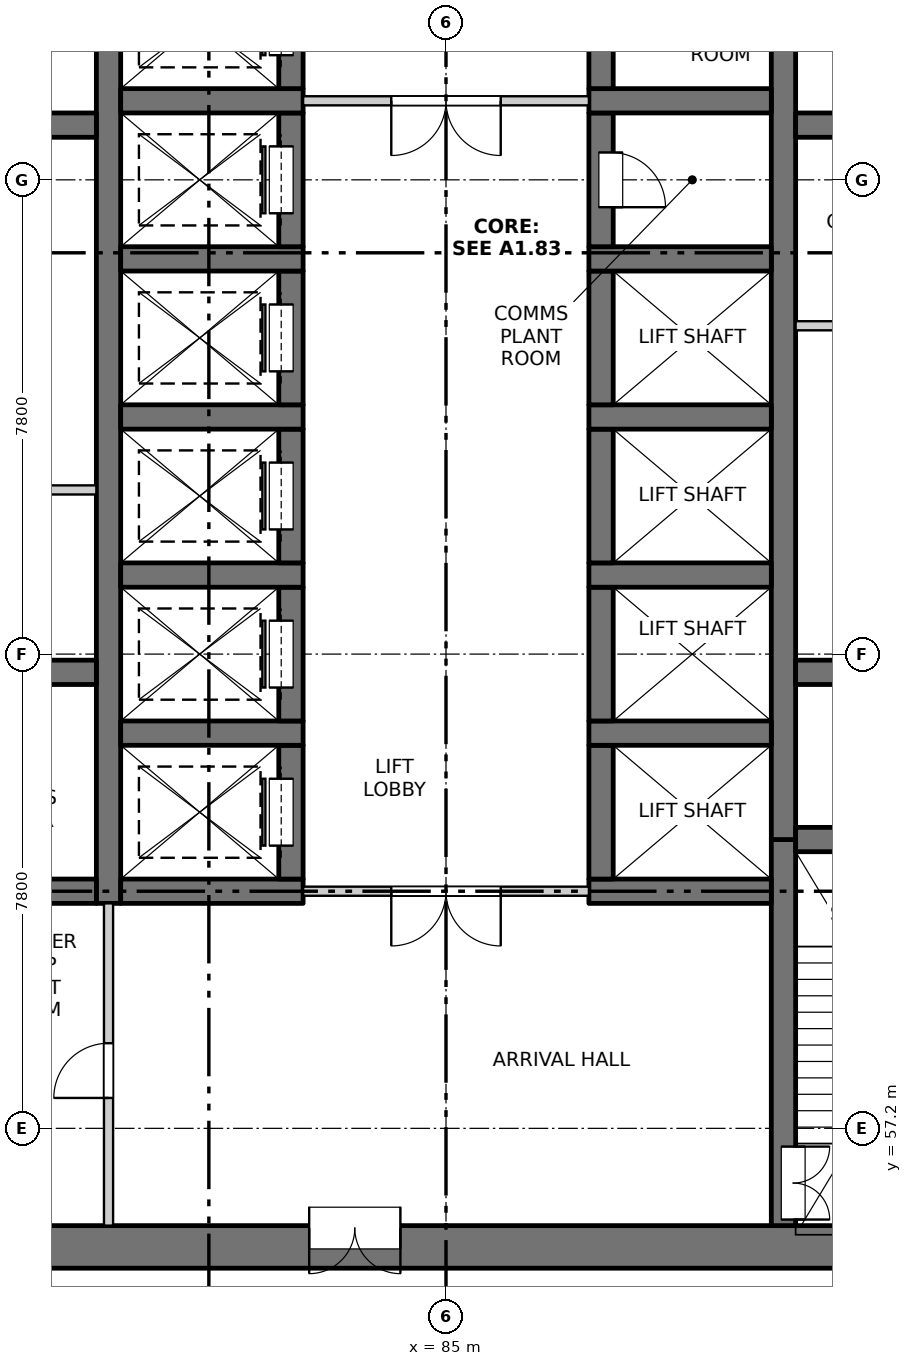
"""IFC4 building model, lengths in metres.
Left out: names, types, materials, properties, quantities, classifications, styles, units other than length and angle.
Written with IfcOpenShell. Run it as: python <this file> out.ifc"""

import sys

from ifc_helpers import new_model, si_unit, direction, frame, frame_2d, origin, place, context, subcontext, project, spatial, rectangle, extrude, element, fill, save


model = new_model("IFC4")
c1 = context("Model", 3, precision=1e-05, world=origin(), true_north=direction((0.0, 1.0)))
c2 = subcontext(c1, "Body", "Model", "MODEL_VIEW")
j1 = project(units=[si_unit("LENGTHUNIT", "METRE"), si_unit("PLANEANGLEUNIT", "RADIAN")], contexts=[c1])
p1 = place(None, origin())
s1 = spatial("IfcSite", under=j1, at=p1, CompositionType="ELEMENT")
p2 = place(p1, origin())
s2 = spatial("IfcBuilding", under=s1, at=p2, CompositionType="ELEMENT")
p3 = place(p2, frame((0.0, 0.0, 95.4)))
s3 = spatial("IfcBuildingStorey", under=s2, at=p3, CompositionType="ELEMENT", Elevation=95.4)
p4 = place(p3, frame((75.6, 55.25, -0.3), z_axis=(0.0, 0.0, 1.0), x_axis=(1.0, 0.0, 0.0)))
e1 = element("IfcWall", 1, at=p4, inside=s3, PredefinedType="SOLIDWALL", context=c2, shape_type="SweptSolid", body=[
    extrude(rectangle(XDim=18.8, YDim=0.7, at=frame_2d((9.4, 0.0))), origin(), (0.0, 0.0, 1.0), 4.5),
])
p5 = place(p4, frame((7.15, 0.0, 0.3)))
e2 = element("IfcOpeningElement", 2, at=p5, cuts=e1, PredefinedType="OPENING", context=c2, shape_type="SweptSolid", body=[
    extrude(rectangle(XDim=1.5, YDim=2.1, at=frame_2d((0.75, 1.05))), frame((0.0, 0.36, 0.0), z_axis=(0.0, -1.0, 0.0), x_axis=(1.0, 0.0, 0.0)), (0.0, 0.0, 1.0), 0.72),
])
p6 = place(p3, frame((79.45, 60.9, -0.3), z_axis=(0.0, 0.0, 1.0), x_axis=(0.0, 1.0, 0.0)))
e3 = element("IfcWall", 3, at=p6, inside=s3, PredefinedType="SOLIDWALL", context=c2, shape_type="SweptSolid", body=[
    extrude(rectangle(XDim=16.4, YDim=0.4, at=frame_2d((8.2, 0.0))), origin(), (0.0, 0.0, 1.0), 4.5),
])
p7 = place(p3, frame((90.55, 55.6, -0.3), z_axis=(0.0, 0.0, 1.0), x_axis=(0.0, 1.0, 0.0)))
e4 = element("IfcWall", 4, at=p7, inside=s3, PredefinedType="SOLIDWALL", context=c2, shape_type="SweptSolid", body=[
    extrude(rectangle(XDim=6.35, YDim=0.4, at=frame_2d((3.175, 0.0))), origin(), (0.0, 0.0, 1.0), 4.5),
])
p8 = place(p7, frame((0.1, 0.0, 0.3)))
e5 = element("IfcOpeningElement", 5, at=p8, cuts=e4, PredefinedType="OPENING", context=c2, shape_type="SweptSolid", body=[
    extrude(rectangle(XDim=1.2, YDim=2.1, at=frame_2d((0.6, 1.05))), frame((0.0, 0.21, 0.0), z_axis=(0.0, -1.0, 0.0), x_axis=(1.0, 0.0, 0.0)), (0.0, 0.0, 1.0), 0.42),
])
p9 = place(p3, frame((90.55, 61.95, -0.3), z_axis=(0.0, 0.0, 1.0), x_axis=(0.0, 1.0, 0.0)))
e6 = element("IfcWall", 6, at=p9, inside=s3, PredefinedType="SOLIDWALL", context=c2, shape_type="SweptSolid", body=[
    extrude(rectangle(XDim=15.35, YDim=0.4, at=frame_2d((7.675, 0.0))), origin(), (0.0, 0.0, 1.0), 4.5),
])
p10 = place(p3, frame((79.65, 61.1, -0.3), z_axis=(0.0, 0.0, 1.0), x_axis=(1.0, 0.0, 0.0)))
e7 = element("IfcWall", 7, at=p10, inside=s3, PredefinedType="SOLIDWALL", context=c2, shape_type="SweptSolid", body=[
    extrude(rectangle(XDim=3.0, YDim=0.4, at=frame_2d((1.5, 0.0))), origin(), (0.0, 0.0, 1.0), 4.5),
])
p11 = place(p3, frame((82.45, 61.3, -0.3), z_axis=(0.0, 0.0, 1.0), x_axis=(0.0, 1.0, 0.0)))
e8 = element("IfcWall", 8, at=p11, inside=s3, PredefinedType="SOLIDWALL", context=c2, shape_type="SweptSolid", body=[
    extrude(rectangle(XDim=2.2, YDim=0.4, at=frame_2d((1.1, 0.0))), origin(), (0.0, 0.0, 1.0), 4.5),
])
p12 = place(p11, frame((0.55, 0.0, 0.3)))
e9 = element("IfcOpeningElement", 9, at=p12, cuts=e8, PredefinedType="OPENING", context=c2, shape_type="SweptSolid", body=[
    extrude(rectangle(XDim=1.1, YDim=2.1, at=frame_2d((0.55, 1.05))), frame((0.0, 0.21, 0.0), z_axis=(0.0, -1.0, 0.0), x_axis=(1.0, 0.0, 0.0)), (0.0, 0.0, 1.0), 0.42),
])
p13 = place(p3, frame((79.65, 63.7, -0.3), z_axis=(0.0, 0.0, 1.0), x_axis=(1.0, 0.0, 0.0)))
e10 = element("IfcWall", 10, at=p13, inside=s3, PredefinedType="SOLIDWALL", context=c2, shape_type="SweptSolid", body=[
    extrude(rectangle(XDim=3.0, YDim=0.4, at=frame_2d((1.5, 0.0))), origin(), (0.0, 0.0, 1.0), 4.5),
])
p14 = place(p3, frame((82.45, 63.9, -0.3), z_axis=(0.0, 0.0, 1.0), x_axis=(0.0, 1.0, 0.0)))
e11 = element("IfcWall", 11, at=p14, inside=s3, PredefinedType="SOLIDWALL", context=c2, shape_type="SweptSolid", body=[
    extrude(rectangle(XDim=2.2, YDim=0.4, at=frame_2d((1.1, 0.0))), origin(), (0.0, 0.0, 1.0), 4.5),
])
p15 = place(p14, frame((0.55, 0.0, 0.3)))
e12 = element("IfcOpeningElement", 12, at=p15, cuts=e11, PredefinedType="OPENING", context=c2, shape_type="SweptSolid", body=[
    extrude(rectangle(XDim=1.1, YDim=2.1, at=frame_2d((0.55, 1.05))), frame((0.0, 0.21, 0.0), z_axis=(0.0, -1.0, 0.0), x_axis=(1.0, 0.0, 0.0)), (0.0, 0.0, 1.0), 0.42),
])
p16 = place(p3, frame((79.65, 66.3, -0.3), z_axis=(0.0, 0.0, 1.0), x_axis=(1.0, 0.0, 0.0)))
e13 = element("IfcWall", 13, at=p16, inside=s3, PredefinedType="SOLIDWALL", context=c2, shape_type="SweptSolid", body=[
    extrude(rectangle(XDim=3.0, YDim=0.4, at=frame_2d((1.5, 0.0))), origin(), (0.0, 0.0, 1.0), 4.5),
])
p17 = place(p3, frame((82.45, 66.5, -0.3), z_axis=(0.0, 0.0, 1.0), x_axis=(0.0, 1.0, 0.0)))
e14 = element("IfcWall", 14, at=p17, inside=s3, PredefinedType="SOLIDWALL", context=c2, shape_type="SweptSolid", body=[
    extrude(rectangle(XDim=2.2, YDim=0.4, at=frame_2d((1.1, 0.0))), origin(), (0.0, 0.0, 1.0), 4.5),
])
p18 = place(p17, frame((0.55, 0.0, 0.3)))
e15 = element("IfcOpeningElement", 15, at=p18, cuts=e14, PredefinedType="OPENING", context=c2, shape_type="SweptSolid", body=[
    extrude(rectangle(XDim=1.1, YDim=2.1, at=frame_2d((0.55, 1.05))), frame((0.0, 0.21, 0.0), z_axis=(0.0, -1.0, 0.0), x_axis=(1.0, 0.0, 0.0)), (0.0, 0.0, 1.0), 0.42),
])
p19 = place(p3, frame((79.65, 68.9, -0.3), z_axis=(0.0, 0.0, 1.0), x_axis=(1.0, 0.0, 0.0)))
e16 = element("IfcWall", 16, at=p19, inside=s3, PredefinedType="SOLIDWALL", context=c2, shape_type="SweptSolid", body=[
    extrude(rectangle(XDim=3.0, YDim=0.4, at=frame_2d((1.5, 0.0))), origin(), (0.0, 0.0, 1.0), 4.5),
])
p20 = place(p3, frame((82.45, 69.1, -0.3), z_axis=(0.0, 0.0, 1.0), x_axis=(0.0, 1.0, 0.0)))
e17 = element("IfcWall", 17, at=p20, inside=s3, PredefinedType="SOLIDWALL", context=c2, shape_type="SweptSolid", body=[
    extrude(rectangle(XDim=2.2, YDim=0.4, at=frame_2d((1.1, 0.0))), origin(), (0.0, 0.0, 1.0), 4.5),
])
p21 = place(p20, frame((0.55, 0.0, 0.3)))
e18 = element("IfcOpeningElement", 18, at=p21, cuts=e17, PredefinedType="OPENING", context=c2, shape_type="SweptSolid", body=[
    extrude(rectangle(XDim=1.1, YDim=2.1, at=frame_2d((0.55, 1.05))), frame((0.0, 0.21, 0.0), z_axis=(0.0, -1.0, 0.0), x_axis=(1.0, 0.0, 0.0)), (0.0, 0.0, 1.0), 0.42),
])
p22 = place(p3, frame((79.65, 71.5, -0.3), z_axis=(0.0, 0.0, 1.0), x_axis=(1.0, 0.0, 0.0)))
e19 = element("IfcWall", 19, at=p22, inside=s3, PredefinedType="SOLIDWALL", context=c2, shape_type="SweptSolid", body=[
    extrude(rectangle(XDim=3.0, YDim=0.4, at=frame_2d((1.5, 0.0))), origin(), (0.0, 0.0, 1.0), 4.5),
])
p23 = place(p3, frame((82.45, 71.7, -0.3), z_axis=(0.0, 0.0, 1.0), x_axis=(0.0, 1.0, 0.0)))
e20 = element("IfcWall", 20, at=p23, inside=s3, PredefinedType="SOLIDWALL", context=c2, shape_type="SweptSolid", body=[
    extrude(rectangle(XDim=2.2, YDim=0.4, at=frame_2d((1.1, 0.0))), origin(), (0.0, 0.0, 1.0), 4.5),
])
p24 = place(p23, frame((0.55, 0.0, 0.3)))
e21 = element("IfcOpeningElement", 21, at=p24, cuts=e20, PredefinedType="OPENING", context=c2, shape_type="SweptSolid", body=[
    extrude(rectangle(XDim=1.1, YDim=2.1, at=frame_2d((0.55, 1.05))), frame((0.0, 0.21, 0.0), z_axis=(0.0, -1.0, 0.0), x_axis=(1.0, 0.0, 0.0)), (0.0, 0.0, 1.0), 0.42),
])
p25 = place(p3, frame((79.65, 74.1, -0.3), z_axis=(0.0, 0.0, 1.0), x_axis=(1.0, 0.0, 0.0)))
e22 = element("IfcWall", 22, at=p25, inside=s3, PredefinedType="SOLIDWALL", context=c2, shape_type="SweptSolid", body=[
    extrude(rectangle(XDim=3.0, YDim=0.4, at=frame_2d((1.5, 0.0))), origin(), (0.0, 0.0, 1.0), 4.5),
])
p26 = place(p3, frame((82.45, 74.3, -0.3), z_axis=(0.0, 0.0, 1.0), x_axis=(0.0, 1.0, 0.0)))
e23 = element("IfcWall", 23, at=p26, inside=s3, PredefinedType="SOLIDWALL", context=c2, shape_type="SweptSolid", body=[
    extrude(rectangle(XDim=2.2, YDim=0.4, at=frame_2d((1.1, 0.0))), origin(), (0.0, 0.0, 1.0), 4.5),
])
p27 = place(p26, frame((0.55, 0.0, 0.3)))
e24 = element("IfcOpeningElement", 24, at=p27, cuts=e23, PredefinedType="OPENING", context=c2, shape_type="SweptSolid", body=[
    extrude(rectangle(XDim=1.1, YDim=2.1, at=frame_2d((0.55, 1.05))), frame((0.0, 0.21, 0.0), z_axis=(0.0, -1.0, 0.0), x_axis=(1.0, 0.0, 0.0)), (0.0, 0.0, 1.0), 0.42),
])
p28 = place(p3, frame((87.35, 61.1, -0.3), z_axis=(0.0, 0.0, 1.0), x_axis=(1.0, 0.0, 0.0)))
e25 = element("IfcWall", 25, at=p28, inside=s3, PredefinedType="SOLIDWALL", context=c2, shape_type="SweptSolid", body=[
    extrude(rectangle(XDim=3.0, YDim=0.4, at=frame_2d((1.5, 0.0))), origin(), (0.0, 0.0, 1.0), 4.5),
])
p29 = place(p3, frame((87.55, 61.3, -0.3), z_axis=(0.0, 0.0, 1.0), x_axis=(0.0, 1.0, 0.0)))
e26 = element("IfcWall", 26, at=p29, inside=s3, PredefinedType="SOLIDWALL", context=c2, shape_type="SweptSolid", body=[
    extrude(rectangle(XDim=2.2, YDim=0.4, at=frame_2d((1.1, 0.0))), origin(), (0.0, 0.0, 1.0), 4.5),
])
p30 = place(p3, frame((87.35, 63.7, -0.3), z_axis=(0.0, 0.0, 1.0), x_axis=(1.0, 0.0, 0.0)))
e27 = element("IfcWall", 27, at=p30, inside=s3, PredefinedType="SOLIDWALL", context=c2, shape_type="SweptSolid", body=[
    extrude(rectangle(XDim=3.0, YDim=0.4, at=frame_2d((1.5, 0.0))), origin(), (0.0, 0.0, 1.0), 4.5),
])
p31 = place(p3, frame((87.55, 63.9, -0.3), z_axis=(0.0, 0.0, 1.0), x_axis=(0.0, 1.0, 0.0)))
e28 = element("IfcWall", 28, at=p31, inside=s3, PredefinedType="SOLIDWALL", context=c2, shape_type="SweptSolid", body=[
    extrude(rectangle(XDim=2.2, YDim=0.4, at=frame_2d((1.1, 0.0))), origin(), (0.0, 0.0, 1.0), 4.5),
])
p32 = place(p3, frame((87.35, 66.3, -0.3), z_axis=(0.0, 0.0, 1.0), x_axis=(1.0, 0.0, 0.0)))
e29 = element("IfcWall", 29, at=p32, inside=s3, PredefinedType="SOLIDWALL", context=c2, shape_type="SweptSolid", body=[
    extrude(rectangle(XDim=3.0, YDim=0.4, at=frame_2d((1.5, 0.0))), origin(), (0.0, 0.0, 1.0), 4.5),
])
p33 = place(p3, frame((87.55, 66.5, -0.3), z_axis=(0.0, 0.0, 1.0), x_axis=(0.0, 1.0, 0.0)))
e30 = element("IfcWall", 30, at=p33, inside=s3, PredefinedType="SOLIDWALL", context=c2, shape_type="SweptSolid", body=[
    extrude(rectangle(XDim=2.2, YDim=0.4, at=frame_2d((1.1, 0.0))), origin(), (0.0, 0.0, 1.0), 4.5),
])
p34 = place(p3, frame((87.35, 68.9, -0.3), z_axis=(0.0, 0.0, 1.0), x_axis=(1.0, 0.0, 0.0)))
e31 = element("IfcWall", 31, at=p34, inside=s3, PredefinedType="SOLIDWALL", context=c2, shape_type="SweptSolid", body=[
    extrude(rectangle(XDim=3.0, YDim=0.4, at=frame_2d((1.5, 0.0))), origin(), (0.0, 0.0, 1.0), 4.5),
])
p35 = place(p3, frame((87.55, 69.1, -0.3), z_axis=(0.0, 0.0, 1.0), x_axis=(0.0, 1.0, 0.0)))
e32 = element("IfcWall", 32, at=p35, inside=s3, PredefinedType="SOLIDWALL", context=c2, shape_type="SweptSolid", body=[
    extrude(rectangle(XDim=2.2, YDim=0.4, at=frame_2d((1.1, 0.0))), origin(), (0.0, 0.0, 1.0), 4.5),
])
p36 = place(p3, frame((87.35, 71.5, -0.3), z_axis=(0.0, 0.0, 1.0), x_axis=(1.0, 0.0, 0.0)))
e33 = element("IfcWall", 33, at=p36, inside=s3, PredefinedType="SOLIDWALL", context=c2, shape_type="SweptSolid", body=[
    extrude(rectangle(XDim=3.0, YDim=0.4, at=frame_2d((1.5, 0.0))), origin(), (0.0, 0.0, 1.0), 4.5),
])
p37 = place(p3, frame((87.55, 71.7, -0.3), z_axis=(0.0, 0.0, 1.0), x_axis=(0.0, 1.0, 0.0)))
e34 = element("IfcWall", 34, at=p37, inside=s3, PredefinedType="SOLIDWALL", context=c2, shape_type="SweptSolid", body=[
    extrude(rectangle(XDim=2.2, YDim=0.4, at=frame_2d((1.1, 0.0))), origin(), (0.0, 0.0, 1.0), 4.5),
])
p38 = place(p37, frame((0.65, 0.0, 0.3)))
e35 = element("IfcOpeningElement", 35, at=p38, cuts=e34, PredefinedType="OPENING", context=c2, shape_type="SweptSolid", body=[
    extrude(rectangle(XDim=0.9, YDim=2.1, at=frame_2d((0.45, 1.05))), frame((0.0, 0.21, 0.0), z_axis=(0.0, -1.0, 0.0), x_axis=(1.0, 0.0, 0.0)), (0.0, 0.0, 1.0), 0.42),
])
p39 = place(p3, frame((87.35, 74.1, -0.3), z_axis=(0.0, 0.0, 1.0), x_axis=(1.0, 0.0, 0.0)))
e36 = element("IfcWall", 36, at=p39, inside=s3, PredefinedType="SOLIDWALL", context=c2, shape_type="SweptSolid", body=[
    extrude(rectangle(XDim=3.0, YDim=0.4, at=frame_2d((1.5, 0.0))), origin(), (0.0, 0.0, 1.0), 4.5),
])
p40 = place(p3, frame((87.55, 74.3, -0.3), z_axis=(0.0, 0.0, 1.0), x_axis=(0.0, 1.0, 0.0)))
e37 = element("IfcWall", 37, at=p40, inside=s3, PredefinedType="SOLIDWALL", context=c2, shape_type="SweptSolid", body=[
    extrude(rectangle(XDim=2.2, YDim=0.4, at=frame_2d((1.1, 0.0))), origin(), (0.0, 0.0, 1.0), 4.5),
])
p41 = place(p40, frame((0.65, 0.0, 0.3)))
e38 = element("IfcOpeningElement", 38, at=p41, cuts=e37, PredefinedType="OPENING", context=c2, shape_type="SweptSolid", body=[
    extrude(rectangle(XDim=0.9, YDim=2.1, at=frame_2d((0.45, 1.05))), frame((0.0, 0.21, 0.0), z_axis=(0.0, -1.0, 0.0), x_axis=(1.0, 0.0, 0.0)), (0.0, 0.0, 1.0), 0.42),
])
for number, where, z_axis, x_axis in (
    (39, (75.6, 61.1, -0.3), (0.0, 0.0, 1.0), (1.0, 0.0, 0.0)),
    (40, (75.6, 64.7, -0.3), (0.0, 0.0, 1.0), (1.0, 0.0, 0.0)),
    (41, (75.6, 73.7, -0.3), (0.0, 0.0, 1.0), (1.0, 0.0, 0.0)),
    (42, (90.75, 61.95, -0.3), (0.0, 0.0, 1.0), (1.0, 0.0, 0.0)),
    (43, (90.75, 64.7, -0.3), (0.0, 0.0, 1.0), (1.0, 0.0, 0.0)),
    (44, (90.75, 73.7, -0.3), (0.0, 0.0, 1.0), (1.0, 0.0, 0.0)),
):
    element("IfcWall", number, at=place(p3, frame(where, z_axis=z_axis, x_axis=x_axis)), inside=s3, PredefinedType="SOLIDWALL", context=c2, shape_type="SweptSolid", body=[
        extrude(rectangle(XDim=3.65, YDim=0.4, at=frame_2d((1.825, 0.0))), origin(), (0.0, 0.0, 1.0), 4.5),
    ])
p42 = place(p3, frame((82.65, 61.1, 0.0), z_axis=(0.0, 0.0, 1.0), x_axis=(1.0, 0.0, 0.0)))
e45 = element("IfcWall", 45, at=p42, inside=s3, PredefinedType="PARTITIONING", context=c2, shape_type="SweptSolid", body=[
    extrude(rectangle(XDim=4.7, YDim=0.15, at=frame_2d((2.35, 0.0))), origin(), (0.0, 0.0, 1.0), 4.2),
])
p43 = place(p42, frame((1.45, 0.0, 0.0)))
e46 = element("IfcOpeningElement", 46, at=p43, cuts=e45, PredefinedType="OPENING", context=c2, shape_type="SweptSolid", body=[
    extrude(rectangle(XDim=1.8, YDim=2.1, at=frame_2d((0.9, 1.05))), frame((0.0, 0.085, 0.0), z_axis=(0.0, -1.0, 0.0), x_axis=(1.0, 0.0, 0.0)), (0.0, 0.0, 1.0), 0.17),
])
p44 = place(p3, frame((75.6, 67.7, 0.0), z_axis=(0.0, 0.0, 1.0), x_axis=(1.0, 0.0, 0.0)))
e47 = element("IfcWall", 47, at=p44, inside=s3, PredefinedType="PARTITIONING", context=c2, shape_type="SweptSolid", body=[
    extrude(rectangle(XDim=3.65, YDim=0.15, at=frame_2d((1.825, 0.0))), origin(), (0.0, 0.0, 1.0), 4.2),
])
p45 = place(p3, frame((90.75, 70.4, 0.0), z_axis=(0.0, 0.0, 1.0), x_axis=(1.0, 0.0, 0.0)))
e48 = element("IfcWall", 48, at=p45, inside=s3, PredefinedType="PARTITIONING", context=c2, shape_type="SweptSolid", body=[
    extrude(rectangle(XDim=3.65, YDim=0.15, at=frame_2d((1.825, 0.0))), origin(), (0.0, 0.0, 1.0), 4.2),
])
p46 = place(p3, frame((82.65, 74.1, 0.0), z_axis=(0.0, 0.0, 1.0), x_axis=(1.0, 0.0, 0.0)))
e49 = element("IfcWall", 49, at=p46, inside=s3, PredefinedType="PARTITIONING", context=c2, shape_type="SweptSolid", body=[
    extrude(rectangle(XDim=4.7, YDim=0.15, at=frame_2d((2.35, 0.0))), origin(), (0.0, 0.0, 1.0), 4.2),
])
p47 = place(p46, frame((1.45, 0.0, 0.0)))
e50 = element("IfcOpeningElement", 50, at=p47, cuts=e49, PredefinedType="OPENING", context=c2, shape_type="SweptSolid", body=[
    extrude(rectangle(XDim=1.8, YDim=2.1, at=frame_2d((0.9, 1.05))), frame((0.0, 0.085, 0.0), z_axis=(0.0, -1.0, 0.0), x_axis=(1.0, 0.0, 0.0)), (0.0, 0.0, 1.0), 0.17),
])
p48 = place(p3, frame((79.45, 55.6, 0.0), z_axis=(0.0, 0.0, 1.0), x_axis=(0.0, 1.0, 0.0)))
e51 = element("IfcWall", 51, at=p48, inside=s3, PredefinedType="PARTITIONING", context=c2, shape_type="SweptSolid", body=[
    extrude(rectangle(XDim=5.3, YDim=0.15, at=frame_2d((2.65, 0.0))), origin(), (0.0, 0.0, 1.0), 4.2),
])
p49 = place(p48, frame((2.1, 0.0, 0.0)))
e52 = element("IfcOpeningElement", 52, at=p49, cuts=e51, PredefinedType="OPENING", context=c2, shape_type="SweptSolid", body=[
    extrude(rectangle(XDim=0.9, YDim=2.1, at=frame_2d((0.45, 1.05))), frame((0.0, 0.085, 0.0), z_axis=(0.0, -1.0, 0.0), x_axis=(1.0, 0.0, 0.0)), (0.0, 0.0, 1.0), 0.17),
])
p50 = place(p5, origin())
e53 = element("IfcDoor", 53, at=p50, inside=s3, OperationType="DOUBLE_DOOR_SINGLE_SWING", PredefinedType="DOOR", context=c2, shape_type="SweptSolid", body=[
    extrude(rectangle(XDim=1.5, YDim=2.1, at=frame_2d((0.75, 1.05))), frame((0.0, 0.335, 0.0), z_axis=(0.0, -1.0, 0.0), x_axis=(1.0, 0.0, 0.0)), (0.0, 0.0, 1.0), 0.05),
])
fill(e2, e53)
p51 = place(p8, origin())
e54 = element("IfcDoor", 54, at=p51, inside=s3, OperationType="DOUBLE_DOOR_SINGLE_SWING", PredefinedType="DOOR", context=c2, shape_type="SweptSolid", body=[
    extrude(rectangle(XDim=1.2, YDim=2.1, at=frame_2d((0.6, 1.05))), frame((0.0, -0.135, 0.0), z_axis=(0.0, -1.0, 0.0), x_axis=(1.0, 0.0, 0.0)), (0.0, 0.0, 1.0), 0.05),
])
fill(e5, e54)
p52 = place(p49, origin())
e55 = element("IfcDoor", 55, at=p52, inside=s3, OperationType="SINGLE_SWING_LEFT", PredefinedType="DOOR", context=c2, shape_type="SweptSolid", body=[
    extrude(rectangle(XDim=0.9, YDim=2.1, at=frame_2d((0.45, 1.05))), frame((0.0, 0.025, 0.0), z_axis=(0.0, -1.0, 0.0), x_axis=(1.0, 0.0, 0.0)), (0.0, 0.0, 1.0), 0.05),
])
fill(e52, e55)
p53 = place(p43, origin())
e56 = element("IfcDoor", 56, at=p53, inside=s3, OperationType="DOUBLE_DOOR_SINGLE_SWING", PredefinedType="DOOR", context=c2, shape_type="SweptSolid", body=[
    extrude(rectangle(XDim=1.8, YDim=2.1, at=frame_2d((0.9, 1.05))), frame((0.0, 0.025, 0.0), z_axis=(0.0, -1.0, 0.0), x_axis=(1.0, 0.0, 0.0)), (0.0, 0.0, 1.0), 0.05),
])
fill(e46, e56)
p54 = place(p12, origin())
e57 = element("IfcDoor", 57, at=p54, inside=s3, OperationType="SLIDING_TO_RIGHT", PredefinedType="DOOR", context=c2, shape_type="SweptSolid", body=[
    extrude(rectangle(XDim=1.1, YDim=2.1, at=frame_2d((0.55, 1.05))), frame((0.0, 0.185, 0.0), z_axis=(0.0, -1.0, 0.0), x_axis=(1.0, 0.0, 0.0)), (0.0, 0.0, 1.0), 0.05),
])
fill(e9, e57)
p55 = place(p15, origin())
e58 = element("IfcDoor", 58, at=p55, inside=s3, OperationType="SLIDING_TO_RIGHT", PredefinedType="DOOR", context=c2, shape_type="SweptSolid", body=[
    extrude(rectangle(XDim=1.1, YDim=2.1, at=frame_2d((0.55, 1.05))), frame((0.0, 0.185, 0.0), z_axis=(0.0, -1.0, 0.0), x_axis=(1.0, 0.0, 0.0)), (0.0, 0.0, 1.0), 0.05),
])
fill(e12, e58)
p56 = place(p18, origin())
e59 = element("IfcDoor", 59, at=p56, inside=s3, OperationType="SLIDING_TO_RIGHT", PredefinedType="DOOR", context=c2, shape_type="SweptSolid", body=[
    extrude(rectangle(XDim=1.1, YDim=2.1, at=frame_2d((0.55, 1.05))), frame((0.0, 0.185, 0.0), z_axis=(0.0, -1.0, 0.0), x_axis=(1.0, 0.0, 0.0)), (0.0, 0.0, 1.0), 0.05),
])
fill(e15, e59)
p57 = place(p21, origin())
e60 = element("IfcDoor", 60, at=p57, inside=s3, OperationType="SLIDING_TO_LEFT", PredefinedType="DOOR", context=c2, shape_type="SweptSolid", body=[
    extrude(rectangle(XDim=1.1, YDim=2.1, at=frame_2d((0.55, 1.05))), frame((0.0, 0.185, 0.0), z_axis=(0.0, -1.0, 0.0), x_axis=(1.0, 0.0, 0.0)), (0.0, 0.0, 1.0), 0.05),
])
fill(e18, e60)
p58 = place(p24, origin())
e61 = element("IfcDoor", 61, at=p58, inside=s3, OperationType="SLIDING_TO_LEFT", PredefinedType="DOOR", context=c2, shape_type="SweptSolid", body=[
    extrude(rectangle(XDim=1.1, YDim=2.1, at=frame_2d((0.55, 1.05))), frame((0.0, 0.185, 0.0), z_axis=(0.0, -1.0, 0.0), x_axis=(1.0, 0.0, 0.0)), (0.0, 0.0, 1.0), 0.05),
])
fill(e21, e61)
p59 = place(p38, origin())
e62 = element("IfcDoor", 62, at=p59, inside=s3, OperationType="SINGLE_SWING_RIGHT", PredefinedType="DOOR", context=c2, shape_type="SweptSolid", body=[
    extrude(rectangle(XDim=0.9, YDim=2.1, at=frame_2d((0.45, 1.05))), frame((0.0, -0.135, 0.0), z_axis=(0.0, -1.0, 0.0), x_axis=(1.0, 0.0, 0.0)), (0.0, 0.0, 1.0), 0.05),
])
fill(e35, e62)
p60 = place(p47, origin())
e63 = element("IfcDoor", 63, at=p60, inside=s3, OperationType="DOUBLE_DOOR_SINGLE_SWING", PredefinedType="DOOR", context=c2, shape_type="SweptSolid", body=[
    extrude(rectangle(XDim=1.8, YDim=2.1, at=frame_2d((0.9, 1.05))), frame((0.0, 0.025, 0.0), z_axis=(0.0, -1.0, 0.0), x_axis=(1.0, 0.0, 0.0)), (0.0, 0.0, 1.0), 0.05),
])
fill(e50, e63)
p61 = place(p27, origin())
e64 = element("IfcDoor", 64, at=p61, inside=s3, OperationType="SLIDING_TO_LEFT", PredefinedType="DOOR", context=c2, shape_type="SweptSolid", body=[
    extrude(rectangle(XDim=1.1, YDim=2.1, at=frame_2d((0.55, 1.05))), frame((0.0, 0.185, 0.0), z_axis=(0.0, -1.0, 0.0), x_axis=(1.0, 0.0, 0.0)), (0.0, 0.0, 1.0), 0.05),
])
fill(e24, e64)
save(model, sys.argv[1])
